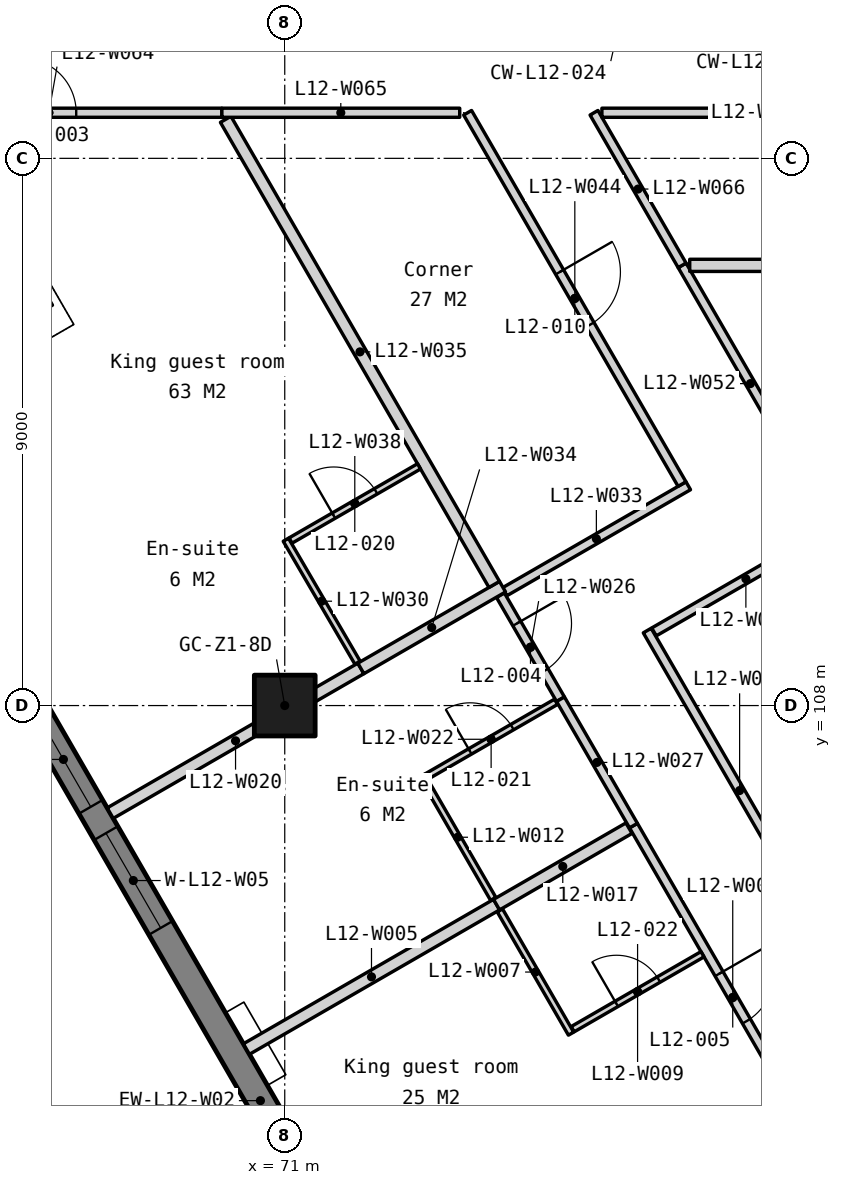
"""IFC4 building model, lengths in metres.
Left out: names, types, materials, properties, quantities, classifications, styles, units other than length and angle.
Written with IfcOpenShell. Run it as: python <this file> out.ifc"""

import sys

from ifc_helpers import new_model, si_unit, direction, frame, frame_2d, origin, origin_2d, place, context, subcontext, project, spatial, polyline, rectangle, outline, extrude, element, fill, save


model = new_model("IFC4")
c1 = context("Model", 3, precision=1e-05, world=origin(), true_north=direction((0.0, 1.0)))
c2 = subcontext(c1, "Body", "Model", "MODEL_VIEW")
j1 = project(units=[si_unit("LENGTHUNIT", "METRE"), si_unit("PLANEANGLEUNIT", "RADIAN")], contexts=[c1])
p1 = place(None, origin())
s1 = spatial("IfcSite", under=j1, at=p1, CompositionType="ELEMENT")
p2 = place(p1, origin())
s2 = spatial("IfcBuilding", under=s1, at=p2, CompositionType="ELEMENT")
p3 = place(p2, frame((0.0, 0.0, 56.0)))
s3 = spatial("IfcBuildingStorey", under=s2, at=p3, CompositionType="ELEMENT", Elevation=56.0)
p4 = place(p3, frame((71.0, 108.0, 0.0), z_axis=(0.0, 0.0, 1.0), x_axis=(1.0, 0.0, 0.0)))
e1 = element("IfcColumn", 1, at=p4, inside=s3, PredefinedType="COLUMN", context=c2, shape_type="SweptSolid", body=[
    extrude(rectangle(XDim=1.0, YDim=1.0, at=origin_2d()), origin(), (0.0, 0.0, 1.0), 3.5),
])
p5 = place(p3, frame((64.305, 112.405, -0.15), z_axis=(0.0, 0.0, 1.0), x_axis=(0.499997464327, -0.866026867751, 0.0)))
e2 = element("IfcWall", 2, at=p5, inside=s3, PredefinedType="SOLIDWALL", context=c2, shape_type="SweptSolid", body=[
    extrude(outline(polyline([(25.18, 3.5), (25.18, 0.0), (0.0, 0.0), (0.0, 3.5), (25.18, 3.5)])), frame((0.0, 0.225, 0.0), z_axis=(0.0, -1.0, 0.0), x_axis=(1.0, 0.0, 0.0)), (0.0, 0.0, 1.0), 0.45),
])
p6 = place(p5, frame((5.21, 0.0, 1.05)))
e3 = element("IfcOpeningElement", 3, at=p6, cuts=e2, PredefinedType="OPENING", context=c2, shape_type="SweptSolid", body=[
    extrude(rectangle(XDim=1.8, YDim=1.5, at=frame_2d((0.9, 0.75))), frame((0.0, 0.235, 0.0), z_axis=(0.0, -1.0, 0.0), x_axis=(1.0, 0.0, 0.0)), (0.0, 0.0, 1.0), 0.47),
])
p7 = place(p5, frame((7.51, 0.0, 1.05)))
e4 = element("IfcOpeningElement", 4, at=p7, cuts=e2, PredefinedType="OPENING", context=c2, shape_type="SweptSolid", body=[
    extrude(rectangle(XDim=1.8, YDim=1.5, at=frame_2d((0.9, 0.75))), frame((0.0, 0.235, 0.0), z_axis=(0.0, -1.0, 0.0), x_axis=(1.0, 0.0, 0.0)), (0.0, 0.0, 1.0), 0.47),
])
p8 = place(p5, frame((14.17, 0.0, 1.05)))
e5 = element("IfcOpeningElement", 5, at=p8, cuts=e2, PredefinedType="OPENING", context=c2, shape_type="SweptSolid", body=[
    extrude(rectangle(XDim=1.8, YDim=1.5, at=frame_2d((0.9, 0.75))), frame((0.0, 0.235, 0.0), z_axis=(0.0, -1.0, 0.0), x_axis=(1.0, 0.0, 0.0)), (0.0, 0.0, 1.0), 0.47),
])
p9 = place(p5, frame((16.47, 0.0, 1.05)))
e6 = element("IfcOpeningElement", 6, at=p9, cuts=e2, PredefinedType="OPENING", context=c2, shape_type="SweptSolid", body=[
    extrude(rectangle(XDim=1.8, YDim=1.5, at=frame_2d((0.9, 0.75))), frame((0.0, 0.235, 0.0), z_axis=(0.0, -1.0, 0.0), x_axis=(1.0, 0.0, 0.0)), (0.0, 0.0, 1.0), 0.47),
])
p10 = place(p5, frame((23.194, 0.0, 1.05)))
e7 = element("IfcOpeningElement", 7, at=p10, cuts=e2, PredefinedType="OPENING", context=c2, shape_type="SweptSolid", body=[
    extrude(rectangle(XDim=1.2, YDim=1.5, at=frame_2d((0.6, 0.75))), frame((0.0, 0.235, 0.0), z_axis=(0.0, -1.0, 0.0), x_axis=(1.0, 0.0, 0.0)), (0.0, 0.0, 1.0), 0.47),
])
p11 = place(p2, frame((0.0, 0.0, 52.5)))
s4 = spatial("IfcBuildingStorey", under=s2, at=p11, CompositionType="ELEMENT", Elevation=52.5)
p12 = place(p11, frame((63.998, 112.488, 0.0), z_axis=(0.0, 0.0, 1.0), x_axis=(0.866005453737, 0.500034552904, 0.0)))
e8 = element("IfcWall", 8, at=p12, inside=s4, PredefinedType="SOLIDWALL", context=c2, shape_type="SweptSolid", body=[
    extrude(rectangle(XDim=3.95, YDim=0.45, at=frame_2d((1.975, 0.0))), origin(), (0.0, 0.0, 1.0), 6.85),
])
p13 = place(p3, frame((76.735, 106.026, 0.0), z_axis=(0.0, 0.0, 1.0), x_axis=(0.499995393218, -0.866028063495, 0.0)))
e9 = element("IfcWall", 9, at=p13, inside=s3, PredefinedType="PARTITIONING", context=c2, shape_type="SweptSolid", body=[
    extrude(rectangle(XDim=6.53, YDim=0.15, at=frame_2d((3.265, 0.0))), origin(), (0.0, 0.0, 1.0), 3.35),
])
p14 = place(p13, frame((2.815, 0.0, 0.0)))
e10 = element("IfcOpeningElement", 10, at=p14, cuts=e9, PredefinedType="OPENING", context=c2, shape_type="SweptSolid", body=[
    extrude(rectangle(XDim=0.9, YDim=2.1, at=frame_2d((0.45, 1.05))), frame((0.0, 0.085, 0.0), z_axis=(0.0, -1.0, 0.0), x_axis=(1.0, 0.0, 0.0)), (0.0, 0.0, 1.0), 0.17),
])
p15 = place(p3, frame((70.37, 102.351, 0.0), z_axis=(0.0, 0.0, 1.0), x_axis=(0.866033238375, 0.499986429846, 0.0)))
e11 = element("IfcWall", 11, at=p15, inside=s3, PredefinedType="PARTITIONING", context=c2, shape_type="SweptSolid", body=[
    extrude(rectangle(XDim=4.75, YDim=0.2, at=frame_2d((2.375, 0.0))), origin(), (0.0, 0.0, 1.0), 3.35),
])
p16 = place(p3, frame((74.538, 104.63, 0.0), z_axis=(0.0, 0.0, 1.0), x_axis=(0.499999433879, -0.866025730634, 0.0)))
e12 = element("IfcWall", 12, at=p16, inside=s3, PredefinedType="PARTITIONING", context=c2, shape_type="SweptSolid", body=[
    extrude(rectangle(XDim=2.34, YDim=0.1, at=frame_2d((1.17, 0.0))), origin(), (0.0, 0.0, 1.0), 3.35),
])
p17 = place(p3, frame((75.735, 102.677, 0.0), z_axis=(0.0, 0.0, 1.0), x_axis=(0.866040446274, 0.499973944738, 0.0)))
e13 = element("IfcWall", 13, at=p17, inside=s3, PredefinedType="PARTITIONING", context=c2, shape_type="SweptSolid", body=[
    extrude(rectangle(XDim=2.465, YDim=0.1, at=frame_2d((1.232, 0.0))), origin(), (0.0, 0.0, 1.0), 3.35),
])
p18 = place(p17, frame((0.833, 0.0, 0.0)))
e14 = element("IfcOpeningElement", 14, at=p18, cuts=e13, PredefinedType="OPENING", context=c2, shape_type="SweptSolid", body=[
    extrude(rectangle(XDim=0.8, YDim=2.1, at=frame_2d((0.4, 1.05))), frame((0.0, 0.06, 0.0), z_axis=(0.0, -1.0, 0.0), x_axis=(1.0, 0.0, 0.0)), (0.0, 0.0, 1.0), 0.12),
])
p19 = place(p3, frame((73.258, 106.847, 0.0), z_axis=(0.0, 0.0, 1.0), x_axis=(0.499999433879, -0.866025730634, 0.0)))
e15 = element("IfcWall", 15, at=p19, inside=s3, PredefinedType="PARTITIONING", context=c2, shape_type="SweptSolid", body=[
    extrude(rectangle(XDim=2.34, YDim=0.1, at=frame_2d((1.17, 0.0))), origin(), (0.0, 0.0, 1.0), 3.35),
])
p20 = place(p3, frame((74.483, 104.726, 0.0), z_axis=(0.0, 0.0, 1.0), x_axis=(0.866006140796, 0.500033362991, 0.0)))
e16 = element("IfcWall", 16, at=p20, inside=s3, PredefinedType="PARTITIONING", context=c2, shape_type="SweptSolid", body=[
    extrude(rectangle(XDim=2.515, YDim=0.2, at=frame_2d((1.257, 0.0))), origin(), (0.0, 0.0, 1.0), 3.35),
])
p21 = place(p3, frame((68.13, 106.23, 0.0), z_axis=(0.0, 0.0, 1.0), x_axis=(0.866037825118, 0.499978485002, 0.0)))
e17 = element("IfcWall", 17, at=p21, inside=s3, PredefinedType="PARTITIONING", context=c2, shape_type="SweptSolid", body=[
    extrude(rectangle(XDim=4.76, YDim=0.2, at=frame_2d((2.38, 0.0))), origin(), (0.0, 0.0, 1.0), 3.35),
])
p22 = place(p3, frame((73.327, 106.829, 0.0), z_axis=(0.0, 0.0, 1.0), x_axis=(0.866040446274, 0.499973944738, 0.0)))
e18 = element("IfcWall", 18, at=p22, inside=s3, PredefinedType="PARTITIONING", context=c2, shape_type="SweptSolid", body=[
    extrude(rectangle(XDim=2.465, YDim=0.1, at=frame_2d((1.232, 0.0))), origin(), (0.0, 0.0, 1.0), 3.35),
])
p23 = place(p22, frame((0.833, 0.0, 0.0)))
e19 = element("IfcOpeningElement", 19, at=p23, cuts=e18, PredefinedType="OPENING", context=c2, shape_type="SweptSolid", body=[
    extrude(rectangle(XDim=0.8, YDim=2.1, at=frame_2d((0.4, 1.05))), frame((0.0, 0.06, 0.0), z_axis=(0.0, -1.0, 0.0), x_axis=(1.0, 0.0, 0.0)), (0.0, 0.0, 1.0), 0.12),
])
p24 = place(p3, frame((74.548, 109.814, 0.0), z_axis=(0.0, 0.0, 1.0), x_axis=(0.499968599967, -0.866043531843, 0.0)))
e20 = element("IfcWall", 20, at=p24, inside=s3, PredefinedType="PARTITIONING", context=c2, shape_type="SweptSolid", body=[
    extrude(rectangle(XDim=1.975, YDim=0.15, at=frame_2d((0.987, 0.0))), origin(), (0.0, 0.0, 1.0), 3.35),
])
p25 = place(p24, frame((0.538, 0.0, 0.0)))
e21 = element("IfcOpeningElement", 21, at=p25, cuts=e20, PredefinedType="OPENING", context=c2, shape_type="SweptSolid", body=[
    extrude(rectangle(XDim=0.9, YDim=2.1, at=frame_2d((0.45, 1.05))), frame((0.0, 0.085, 0.0), z_axis=(0.0, -1.0, 0.0), x_axis=(1.0, 0.0, 0.0)), (0.0, 0.0, 1.0), 0.17),
])
p26 = place(p3, frame((75.535, 108.104, 0.0), z_axis=(0.0, 0.0, 1.0), x_axis=(0.500033551112, -0.866006032174, 0.0)))
e22 = element("IfcWall", 22, at=p26, inside=s3, PredefinedType="PARTITIONING", context=c2, shape_type="SweptSolid", body=[
    extrude(rectangle(XDim=2.4, YDim=0.15, at=frame_2d((1.2, 0.0))), origin(), (0.0, 0.0, 1.0), 3.35),
])
p27 = place(p3, frame((71.018, 110.727, 0.0), z_axis=(0.0, 0.0, 1.0), x_axis=(0.503637463939, -0.863915102841, 0.0)))
e23 = element("IfcWall", 23, at=p27, inside=s3, PredefinedType="PARTITIONING", context=c2, shape_type="SweptSolid", body=[
    extrude(rectangle(XDim=2.34, YDim=0.1, at=frame_2d((1.17, 0.0))), origin(), (0.0, 0.0, 1.0), 3.35),
])
p28 = place(p3, frame((76.961, 109.234, 0.0), z_axis=(0.0, 0.0, 1.0), x_axis=(0.499984420002, -0.866034398714, 0.0)))
e24 = element("IfcWall", 24, at=p28, inside=s3, PredefinedType="PARTITIONING", context=c2, shape_type="SweptSolid", body=[
    extrude(rectangle(XDim=6.077, YDim=0.15, at=frame_2d((3.039, 0.0))), origin(), (0.0, 0.0, 1.0), 3.35),
])
p29 = place(p3, frame((74.614, 109.87, 0.0), z_axis=(0.0, 0.0, 1.0), x_axis=(0.866043466982, 0.49996871232, 0.0)))
e25 = element("IfcWall", 25, at=p29, inside=s3, PredefinedType="PARTITIONING", context=c2, shape_type="SweptSolid", body=[
    extrude(rectangle(XDim=3.49, YDim=0.15, at=frame_2d((1.745, 0.0))), origin(), (0.0, 0.0, 1.0), 3.35),
])
p30 = place(p3, frame((72.252, 108.61, 0.0), z_axis=(0.0, 0.0, 1.0), x_axis=(0.865989100438, 0.500062873969, 0.0)))
e26 = element("IfcWall", 26, at=p30, inside=s3, PredefinedType="PARTITIONING", context=c2, shape_type="SweptSolid", body=[
    extrude(rectangle(XDim=2.69, YDim=0.2, at=frame_2d((1.345, 0.0))), origin(), (0.0, 0.0, 1.0), 3.35),
])
p31 = place(p3, frame((70.029, 117.642, 0.0), z_axis=(0.0, 0.0, 1.0), x_axis=(0.499997595687, -0.866026791911, 0.0)))
e27 = element("IfcWall", 27, at=p31, inside=s3, PredefinedType="PARTITIONING", context=c2, shape_type="SweptSolid", body=[
    extrude(rectangle(XDim=8.833, YDim=0.2, at=frame_2d((4.417, 0.0))), origin(), (0.0, 0.0, 1.0), 3.35),
])
p32 = place(p3, frame((71.095, 110.714, 0.0), z_axis=(0.0, 0.0, 1.0), x_axis=(0.866048967903, 0.499959183527, 0.0)))
e28 = element("IfcWall", 28, at=p32, inside=s3, PredefinedType="PARTITIONING", context=c2, shape_type="SweptSolid", body=[
    extrude(rectangle(XDim=2.44, YDim=0.1, at=frame_2d((1.22, 0.0))), origin(), (0.0, 0.0, 1.0), 3.35),
])
p33 = place(p32, frame((0.82, 0.0, 0.0)))
e29 = element("IfcOpeningElement", 29, at=p33, cuts=e28, PredefinedType="OPENING", context=c2, shape_type="SweptSolid", body=[
    extrude(rectangle(XDim=0.8, YDim=2.1, at=frame_2d((0.4, 1.05))), frame((0.0, 0.06, 0.0), z_axis=(0.0, -1.0, 0.0), x_axis=(1.0, 0.0, 0.0)), (0.0, 0.0, 1.0), 0.12),
])
p34 = place(p3, frame((77.073, 109.211, 0.0), z_axis=(0.0, 0.0, 1.0), x_axis=(0.866013176292, 0.50002117804, 0.0)))
e30 = element("IfcWall", 30, at=p34, inside=s3, PredefinedType="PARTITIONING", context=c2, shape_type="SweptSolid", body=[
    extrude(rectangle(XDim=3.49, YDim=0.15, at=frame_2d((1.745, 0.0))), origin(), (0.0, 0.0, 1.0), 3.35),
])
p35 = place(p3, frame((74.007, 117.75, 0.0), z_axis=(0.0, 0.0, 1.0), x_axis=(0.500026110575, -0.866010328312, 0.0)))
e31 = element("IfcWall", 31, at=p35, inside=s3, PredefinedType="PARTITIONING", context=c2, shape_type="SweptSolid", body=[
    extrude(rectangle(XDim=7.052, YDim=0.15, at=frame_2d((3.526, 0.0))), origin(), (0.0, 0.0, 1.0), 3.35),
])
p36 = place(p35, frame((3.026, 0.0, 0.0)))
e32 = element("IfcOpeningElement", 32, at=p36, cuts=e31, PredefinedType="OPENING", context=c2, shape_type="SweptSolid", body=[
    extrude(rectangle(XDim=1.0, YDim=2.1, at=frame_2d((0.5, 1.05))), frame((0.0, 0.085, 0.0), z_axis=(0.0, -1.0, 0.0), x_axis=(1.0, 0.0, 0.0)), (0.0, 0.0, 1.0), 0.17),
])
p37 = place(p3, frame((77.535, 115.24, 0.0), z_axis=(0.0, 0.0, 1.0), x_axis=(0.500043949999, -0.866000027754, 0.0)))
e33 = element("IfcWall", 33, at=p37, inside=s3, PredefinedType="PARTITIONING", context=c2, shape_type="SweptSolid", body=[
    extrude(rectangle(XDim=4.492, YDim=0.15, at=frame_2d((2.246, 0.0))), origin(), (0.0, 0.0, 1.0), 3.35),
])
p38 = place(p3, frame((77.66, 115.24, 0.0), z_axis=(0.0, 0.0, 1.0), x_axis=(1.0, 0.0, 0.0)))
e34 = element("IfcWall", 34, at=p38, inside=s3, PredefinedType="PARTITIONING", context=c2, shape_type="SweptSolid", body=[
    extrude(rectangle(XDim=8.721, YDim=0.2, at=frame_2d((4.361, 0.0))), origin(), (0.0, 0.0, 1.0), 3.35),
])
p39 = place(p3, frame((64.275, 117.75, 0.0), z_axis=(0.0, 0.0, 1.0), x_axis=(1.0, 0.0, 0.0)))
e35 = element("IfcWall", 35, at=p39, inside=s3, PredefinedType="PARTITIONING", context=c2, shape_type="SweptSolid", body=[
    extrude(rectangle(XDim=5.691, YDim=0.15, at=frame_2d((2.846, 0.0))), origin(), (0.0, 0.0, 1.0), 3.35),
])
p40 = place(p39, frame((2.396, 0.0, 0.0)))
e36 = element("IfcOpeningElement", 36, at=p40, cuts=e35, PredefinedType="OPENING", context=c2, shape_type="SweptSolid", body=[
    extrude(rectangle(XDim=0.9, YDim=2.1, at=frame_2d((0.45, 1.05))), frame((0.0, 0.085, 0.0), z_axis=(0.0, -1.0, 0.0), x_axis=(1.0, 0.0, 0.0)), (0.0, 0.0, 1.0), 0.17),
])
p41 = place(p3, frame((69.966, 117.75, 0.0), z_axis=(0.0, 0.0, 1.0), x_axis=(1.0, 0.0, 0.0)))
e37 = element("IfcWall", 37, at=p41, inside=s3, PredefinedType="PARTITIONING", context=c2, shape_type="SweptSolid", body=[
    extrude(rectangle(XDim=3.911, YDim=0.15, at=frame_2d((1.956, 0.0))), origin(), (0.0, 0.0, 1.0), 3.35),
])
p42 = place(p3, frame((76.086, 117.75, 0.0), z_axis=(0.0, 0.0, 1.0), x_axis=(0.499953366038, -0.866052326241, 0.0)))
e38 = element("IfcWall", 38, at=p42, inside=s3, PredefinedType="PARTITIONING", context=c2, shape_type="SweptSolid", body=[
    extrude(rectangle(XDim=2.898, YDim=0.15, at=frame_2d((1.449, 0.0))), origin(), (0.0, 0.0, 1.0), 3.35),
])
p43 = place(p3, frame((76.216, 117.75, 0.0), z_axis=(0.0, 0.0, 1.0), x_axis=(1.0, 0.0, 0.0)))
e39 = element("IfcWall", 39, at=p43, inside=s3, PredefinedType="PARTITIONING", context=c2, shape_type="SweptSolid", body=[
    extrude(rectangle(XDim=11.61, YDim=0.15, at=frame_2d((5.805, 0.0))), origin(), (0.0, 0.0, 1.0), 3.35),
])
p44 = place(p43, frame((5.355, 0.0, 0.0)))
e40 = element("IfcOpeningElement", 40, at=p44, cuts=e39, PredefinedType="OPENING", context=c2, shape_type="SweptSolid", body=[
    extrude(rectangle(XDim=0.9, YDim=2.1, at=frame_2d((0.45, 1.05))), frame((0.0, 0.085, 0.0), z_axis=(0.0, -1.0, 0.0), x_axis=(1.0, 0.0, 0.0)), (0.0, 0.0, 1.0), 0.17),
])
p45 = place(p6, origin())
e41 = element("IfcWindow", 41, at=p45, inside=s3, PartitioningType="SINGLE_PANEL", PredefinedType="WINDOW", context=c2, shape_type="SweptSolid", body=[
    extrude(rectangle(XDim=1.8, YDim=1.5, at=frame_2d((0.9, 0.75))), frame((0.0, 0.03, 0.0), z_axis=(0.0, -1.0, 0.0), x_axis=(1.0, 0.0, 0.0)), (0.0, 0.0, 1.0), 0.06),
])
fill(e3, e41)
p46 = place(p7, origin())
e42 = element("IfcWindow", 42, at=p46, inside=s3, PartitioningType="SINGLE_PANEL", PredefinedType="WINDOW", context=c2, shape_type="SweptSolid", body=[
    extrude(rectangle(XDim=1.8, YDim=1.5, at=frame_2d((0.9, 0.75))), frame((0.0, 0.03, 0.0), z_axis=(0.0, -1.0, 0.0), x_axis=(1.0, 0.0, 0.0)), (0.0, 0.0, 1.0), 0.06),
])
fill(e4, e42)
p47 = place(p40, origin())
e43 = element("IfcDoor", 43, at=p47, inside=s3, OperationType="SINGLE_SWING_LEFT", PredefinedType="DOOR", context=c2, shape_type="SweptSolid", body=[
    extrude(rectangle(XDim=0.9, YDim=2.1, at=frame_2d((0.45, 1.05))), frame((0.0, 0.025, 0.0), z_axis=(0.0, -1.0, 0.0), x_axis=(1.0, 0.0, 0.0)), (0.0, 0.0, 1.0), 0.05),
])
fill(e36, e43)
p48 = place(p25, origin())
e44 = element("IfcDoor", 44, at=p48, inside=s3, OperationType="SINGLE_SWING_LEFT", PredefinedType="DOOR", context=c2, shape_type="SweptSolid", body=[
    extrude(rectangle(XDim=0.9, YDim=2.1, at=frame_2d((0.45, 1.05))), frame((0.0, 0.025, 0.0), z_axis=(0.0, -1.0, 0.0), x_axis=(1.0, 0.0, 0.0)), (0.0, 0.0, 1.0), 0.05),
])
fill(e21, e44)
p49 = place(p14, origin())
e45 = element("IfcDoor", 45, at=p49, inside=s3, OperationType="SINGLE_SWING_LEFT", PredefinedType="DOOR", context=c2, shape_type="SweptSolid", body=[
    extrude(rectangle(XDim=0.9, YDim=2.1, at=frame_2d((0.45, 1.05))), frame((0.0, 0.025, 0.0), z_axis=(0.0, -1.0, 0.0), x_axis=(1.0, 0.0, 0.0)), (0.0, 0.0, 1.0), 0.05),
])
fill(e10, e45)
p50 = place(p36, origin())
e46 = element("IfcDoor", 46, at=p50, inside=s3, OperationType="SINGLE_SWING_LEFT", PredefinedType="DOOR", context=c2, shape_type="SweptSolid", body=[
    extrude(rectangle(XDim=1.0, YDim=2.1, at=frame_2d((0.5, 1.05))), frame((0.0, 0.025, 0.0), z_axis=(0.0, -1.0, 0.0), x_axis=(1.0, 0.0, 0.0)), (0.0, 0.0, 1.0), 0.05),
])
fill(e32, e46)
p51 = place(p33, origin())
e47 = element("IfcDoor", 47, at=p51, inside=s3, OperationType="SINGLE_SWING_LEFT", PredefinedType="DOOR", context=c2, shape_type="SweptSolid", body=[
    extrude(rectangle(XDim=0.8, YDim=2.1, at=frame_2d((0.4, 1.05))), frame((0.0, 0.025, 0.0), z_axis=(0.0, -1.0, 0.0), x_axis=(1.0, 0.0, 0.0)), (0.0, 0.0, 1.0), 0.05),
])
fill(e29, e47)
p52 = place(p23, origin())
e48 = element("IfcDoor", 48, at=p52, inside=s3, OperationType="SINGLE_SWING_LEFT", PredefinedType="DOOR", context=c2, shape_type="SweptSolid", body=[
    extrude(rectangle(XDim=0.8, YDim=2.1, at=frame_2d((0.4, 1.05))), frame((0.0, 0.025, 0.0), z_axis=(0.0, -1.0, 0.0), x_axis=(1.0, 0.0, 0.0)), (0.0, 0.0, 1.0), 0.05),
])
fill(e19, e48)
p53 = place(p18, origin())
e49 = element("IfcDoor", 49, at=p53, inside=s3, OperationType="SINGLE_SWING_LEFT", PredefinedType="DOOR", context=c2, shape_type="SweptSolid", body=[
    extrude(rectangle(XDim=0.8, YDim=2.1, at=frame_2d((0.4, 1.05))), frame((0.0, 0.025, 0.0), z_axis=(0.0, -1.0, 0.0), x_axis=(1.0, 0.0, 0.0)), (0.0, 0.0, 1.0), 0.05),
])
fill(e14, e49)
save(model, sys.argv[1])
